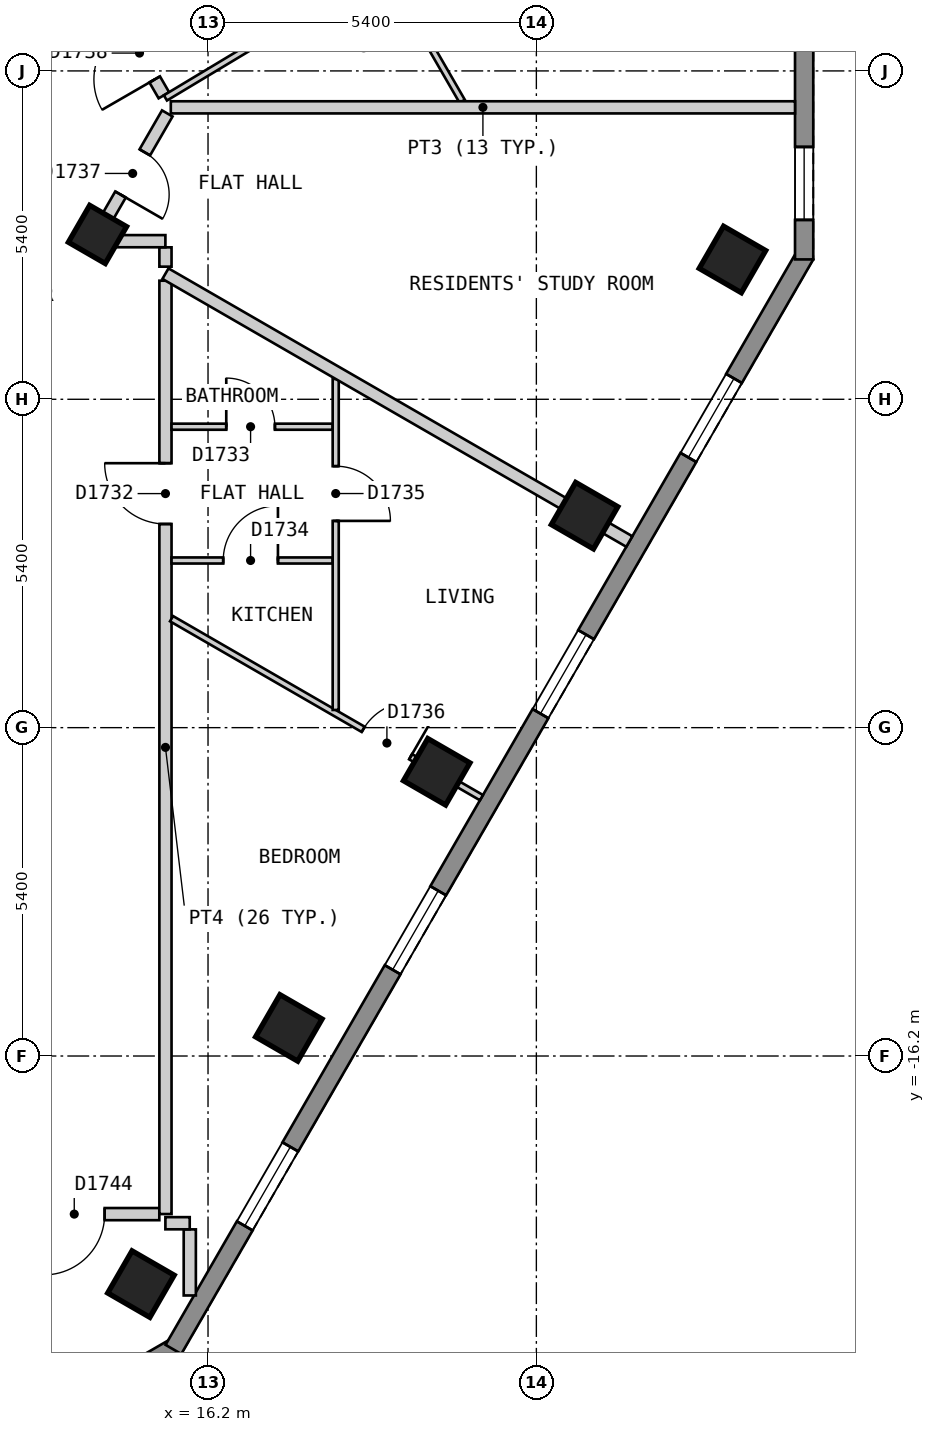
"""IFC4 building model, lengths in metres.
Left out: names, types, materials, properties, quantities, classifications, styles, units other than length and angle.
Written with IfcOpenShell. Run it as: python <this file> out.ifc"""

import sys

from ifc_helpers import new_model, si_unit, direction, frame, frame_2d, origin, origin_2d, place, context, subcontext, project, spatial, polyline, rectangle, outline, extrude, element, fill, save


model = new_model("IFC4")
c1 = context("Model", 3, precision=1e-05, world=origin(), true_north=direction((0.0, 1.0)))
c2 = subcontext(c1, "Body", "Model", "MODEL_VIEW")
j1 = project(units=[si_unit("LENGTHUNIT", "METRE"), si_unit("PLANEANGLEUNIT", "RADIAN")], contexts=[c1])
p1 = place(None, origin())
s1 = spatial("IfcSite", under=j1, at=p1, CompositionType="ELEMENT")
p2 = place(p1, origin())
s2 = spatial("IfcBuilding", under=s1, at=p2, CompositionType="ELEMENT")
p3 = place(p2, frame((0.0, 0.0, 181.2)))
s3 = spatial("IfcBuildingStorey", under=s2, at=p3, CompositionType="ELEMENT", Elevation=181.2)
for number, where, z_axis, x_axis in (
    (1, (15.097, -19.951, 0.0), (0.0, 0.0, 1.0), (0.5, 0.866, 0.0)),
    (2, (17.529, -15.738, 0.0), (0.0, 0.0, 1.0), (0.5, 0.866, 0.0)),
    (3, (19.961, -11.526, 0.0), (0.0, 0.0, 1.0), (0.5, 0.866, 0.0)),
    (4, (22.393, -7.314, 0.0), (0.0, 0.0, 1.0), (0.5, 0.866, 0.0)),
    (5, (24.825, -3.101, 0.0), (0.0, 0.0, 1.0), (0.5, 0.866, 0.0)),
):
    element("IfcColumn", number, at=place(p3, frame(where, z_axis=z_axis, x_axis=x_axis)), inside=s3, PredefinedType="COLUMN", context=c2, shape_type="SweptSolid", body=[
        extrude(rectangle(XDim=0.8, YDim=0.8, at=origin_2d()), origin(), (0.0, 0.0, 1.0), 3.0),
    ])
p4 = place(p3, frame((14.382, -2.689, 0.0), z_axis=(0.0, 0.0, 1.0), x_axis=(0.5, 0.866025403784, 0.0)))
e6 = element("IfcColumn", 6, at=p4, inside=s3, PredefinedType="COLUMN", context=c2, shape_type="SweptSolid", body=[
    extrude(rectangle(XDim=0.7, YDim=0.7, at=origin_2d()), origin(), (0.0, 0.0, 1.0), 3.0),
])
p5 = place(p3, frame((11.356, -23.47, 0.0), z_axis=(0.0, 0.0, 1.0), x_axis=(0.866022959057, 0.500004234368, 0.0)))
e7 = element("IfcWall", 7, at=p5, inside=s3, PredefinedType="SOLIDWALL", context=c2, shape_type="SweptSolid", body=[
    extrude(outline(polyline([(0.0, -0.15), (5.0, -0.15), (4.92, 0.15), (0.08, 0.15), (0.0, -0.15)])), origin(), (0.0, 0.0, 1.0), 2.7),
])
p6 = place(p5, frame((0.65, 0.0, 0.15)))
e8 = element("IfcOpeningElement", 8, at=p6, cuts=e7, PredefinedType="OPENING", context=c2, shape_type="SweptSolid", body=[
    extrude(rectangle(XDim=1.2, YDim=2.1, at=frame_2d((0.6, 1.05))), frame((0.0, 0.16, 0.0), z_axis=(0.0, -1.0, 0.0), x_axis=(1.0, 0.0, 0.0)), (0.0, 0.0, 1.0), 0.32),
])
p7 = place(p3, frame((15.631, -21.025, 0.0), z_axis=(0.0, 0.0, 1.0), x_axis=(0.500018670445, 0.86601462413, 0.0)))
e9 = element("IfcWall", 9, at=p7, inside=s3, PredefinedType="SOLIDWALL", context=c2, shape_type="SweptSolid", body=[
    extrude(outline(polyline([(0.0, -0.15), (20.785, -0.15), (20.705, 0.15), (0.08, 0.15), (0.0, -0.15)])), origin(), (0.0, 0.0, 1.0), 2.7),
])
p8 = place(p7, frame((2.346, 0.0, 0.15)))
e10 = element("IfcOpeningElement", 10, at=p8, cuts=e9, PredefinedType="OPENING", context=c2, shape_type="SweptSolid", body=[
    extrude(rectangle(XDim=1.5, YDim=2.1, at=frame_2d((0.75, 1.05))), frame((0.0, 0.16, 0.0), z_axis=(0.0, -1.0, 0.0), x_axis=(1.0, 0.0, 0.0)), (0.0, 0.0, 1.0), 0.32),
])
p9 = place(p7, frame((7.21, 0.0, 0.15)))
e11 = element("IfcOpeningElement", 11, at=p9, cuts=e9, PredefinedType="OPENING", context=c2, shape_type="SweptSolid", body=[
    extrude(rectangle(XDim=1.5, YDim=2.1, at=frame_2d((0.75, 1.05))), frame((0.0, 0.16, 0.0), z_axis=(0.0, -1.0, 0.0), x_axis=(1.0, 0.0, 0.0)), (0.0, 0.0, 1.0), 0.32),
])
p10 = place(p7, frame((12.073, 0.0, 0.15)))
e12 = element("IfcOpeningElement", 12, at=p10, cuts=e9, PredefinedType="OPENING", context=c2, shape_type="SweptSolid", body=[
    extrude(rectangle(XDim=1.5, YDim=2.1, at=frame_2d((0.75, 1.05))), frame((0.0, 0.16, 0.0), z_axis=(0.0, -1.0, 0.0), x_axis=(1.0, 0.0, 0.0)), (0.0, 0.0, 1.0), 0.32),
])
p11 = place(p7, frame((16.938, 0.0, 0.15)))
e13 = element("IfcOpeningElement", 13, at=p11, cuts=e9, PredefinedType="OPENING", context=c2, shape_type="SweptSolid", body=[
    extrude(rectangle(XDim=1.5, YDim=2.1, at=frame_2d((0.75, 1.05))), frame((0.0, 0.16, 0.0), z_axis=(0.0, -1.0, 0.0), x_axis=(1.0, 0.0, 0.0)), (0.0, 0.0, 1.0), 0.32),
])
p12 = place(p3, frame((26.004, -3.1, 0.0), z_axis=(0.0, 0.0, 1.0), x_axis=(0.0, 1.0, 0.0)))
e14 = element("IfcWall", 14, at=p12, inside=s3, PredefinedType="SOLIDWALL", context=c2, shape_type="SweptSolid", body=[
    extrude(outline(polyline([(0.0, -0.15), (5.0, -0.15), (4.92, 0.15), (0.08, 0.15), (0.0, -0.15)])), origin(), (0.0, 0.0, 1.0), 2.7),
])
p13 = place(p12, frame((0.65, 0.0, 0.15)))
e15 = element("IfcOpeningElement", 15, at=p13, cuts=e14, PredefinedType="OPENING", context=c2, shape_type="SweptSolid", body=[
    extrude(rectangle(XDim=1.2, YDim=2.1, at=frame_2d((0.6, 1.05))), frame((0.0, 0.16, 0.0), z_axis=(0.0, -1.0, 0.0), x_axis=(1.0, 0.0, 0.0)), (0.0, 0.0, 1.0), 0.32),
])
p14 = place(p3, frame((10.739, 7.8, 0.0), z_axis=(0.0, 0.0, 1.0), x_axis=(0.500023726918, -0.866011704609, 0.0)))
e16 = element("IfcWall", 16, at=p14, inside=s3, PredefinedType="PARTITIONING", context=c2, shape_type="SweptSolid", body=[
    extrude(rectangle(XDim=9.47, YDim=0.2, at=frame_2d((4.735, 0.0))), origin(), (0.0, 0.0, 1.0), 2.7),
])
p15 = place(p14, frame((8.168, 0.0, 0.0)))
e17 = element("IfcOpeningElement", 17, at=p15, cuts=e16, PredefinedType="OPENING", context=c2, shape_type="SweptSolid", body=[
    extrude(rectangle(XDim=1.0, YDim=2.1, at=frame_2d((0.5, 1.05))), frame((0.0, 0.11, 0.0), z_axis=(0.0, -1.0, 0.0), x_axis=(1.0, 0.0, 0.0)), (0.0, 0.0, 1.0), 0.22),
])
p16 = place(p3, frame((15.5, -2.901, 0.0), z_axis=(0.0, 0.0, 1.0), x_axis=(0.0, -1.0, 0.0)))
e18 = element("IfcWall", 18, at=p16, inside=s3, PredefinedType="PARTITIONING", context=c2, shape_type="SweptSolid", body=[
    extrude(rectangle(XDim=0.318, YDim=0.2, at=frame_2d((0.159, 0.0))), origin(), (0.0, 0.0, 1.0), 2.7),
])
p17 = place(p3, frame((13.3, -18.8, 0.0), z_axis=(0.0, 0.0, 1.0), x_axis=(1.0, 0.0, 0.0)))
e19 = element("IfcWall", 19, at=p17, inside=s3, PredefinedType="PARTITIONING", context=c2, shape_type="SweptSolid", body=[
    extrude(rectangle(XDim=2.099, YDim=0.2, at=frame_2d((1.049, 0.0))), origin(), (0.0, 0.0, 1.0), 2.7),
])
p18 = place(p17, frame((0.2, 0.0, 0.0)))
e20 = element("IfcOpeningElement", 20, at=p18, cuts=e19, PredefinedType="OPENING", context=c2, shape_type="SweptSolid", body=[
    extrude(rectangle(XDim=1.0, YDim=2.1, at=frame_2d((0.5, 1.05))), frame((0.0, 0.11, 0.0), z_axis=(0.0, -1.0, 0.0), x_axis=(1.0, 0.0, 0.0)), (0.0, 0.0, 1.0), 0.22),
])
p19 = place(p3, frame((14.433, -2.8, 0.0), z_axis=(0.0, 0.0, 1.0), x_axis=(1.0, 0.0, 0.0)))
e21 = element("IfcWall", 21, at=p19, inside=s3, PredefinedType="PARTITIONING", context=c2, shape_type="SweptSolid", body=[
    extrude(rectangle(XDim=1.066, YDim=0.2, at=frame_2d((0.533, 0.0))), origin(), (0.0, 0.0, 1.0), 2.7),
])
p20 = place(p3, frame((14.318, -2.8, 0.0), z_axis=(0.0, 0.0, 1.0), x_axis=(0.49964693309, 0.866229151122, 0.0)))
e22 = element("IfcWall", 22, at=p20, inside=s3, PredefinedType="PARTITIONING", context=c2, shape_type="SweptSolid", body=[
    extrude(rectangle(XDim=2.426, YDim=0.2, at=frame_2d((1.213, 0.0))), origin(), (0.0, 0.0, 1.0), 2.7),
])
p21 = place(p20, frame((0.886, 0.0, 0.0)))
e23 = element("IfcOpeningElement", 23, at=p21, cuts=e22, PredefinedType="OPENING", context=c2, shape_type="SweptSolid", body=[
    extrude(rectangle(XDim=0.8, YDim=2.1, at=frame_2d((0.4, 1.05))), frame((0.0, 0.11, 0.0), z_axis=(0.0, -1.0, 0.0), x_axis=(1.0, 0.0, 0.0)), (0.0, 0.0, 1.0), 0.22),
])
p22 = place(p3, frame((15.5, -18.799, 0.0), z_axis=(0.0, 0.0, 1.0), x_axis=(0.0, 1.0, 0.0)))
e24 = element("IfcWall", 24, at=p22, inside=s3, PredefinedType="PARTITIONING", context=c2, shape_type="SweptSolid", body=[
    extrude(rectangle(XDim=15.349, YDim=0.2, at=frame_2d((7.675, 0.0))), origin(), (0.0, 0.0, 1.0), 2.7),
])
p23 = place(p22, frame((11.348, 0.0, 0.0)))
e25 = element("IfcOpeningElement", 25, at=p23, cuts=e24, PredefinedType="OPENING", context=c2, shape_type="SweptSolid", body=[
    extrude(rectangle(XDim=1.0, YDim=2.1, at=frame_2d((0.5, 1.05))), frame((0.0, 0.11, 0.0), z_axis=(0.0, -1.0, 0.0), x_axis=(1.0, 0.0, 0.0)), (0.0, 0.0, 1.0), 0.22),
])
p24 = place(p3, frame((19.75, 0.592, 0.0), z_axis=(0.0, 0.0, 1.0), x_axis=(0.499974077718, -0.866040369504, 0.0)))
e26 = element("IfcWall", 26, at=p24, inside=s3, PredefinedType="PARTITIONING", context=c2, shape_type="SweptSolid", body=[
    extrude(rectangle(XDim=1.26, YDim=0.1, at=frame_2d((0.63, 0.0))), origin(), (0.0, 0.0, 1.0), 2.7),
])
p25 = place(p3, frame((15.6, -9.008, 0.0), z_axis=(0.0, 0.0, 1.0), x_axis=(0.866013576751, -0.500020484464, 0.0)))
e27 = element("IfcWall", 27, at=p25, inside=s3, PredefinedType="PARTITIONING", context=c2, shape_type="SweptSolid", body=[
    extrude(rectangle(XDim=5.885, YDim=0.1, at=frame_2d((2.943, 0.0))), origin(), (0.0, 0.0, 1.0), 2.7),
])
p26 = place(p25, frame((3.64, 0.0, 0.0)))
e28 = element("IfcOpeningElement", 28, at=p26, cuts=e27, PredefinedType="OPENING", context=c2, shape_type="SweptSolid", body=[
    extrude(rectangle(XDim=0.9, YDim=2.1, at=frame_2d((0.45, 1.05))), frame((0.0, 0.06, 0.0), z_axis=(0.0, -1.0, 0.0), x_axis=(1.0, 0.0, 0.0)), (0.0, 0.0, 1.0), 0.12),
])
p27 = place(p3, frame((15.6, -5.851, 0.0), z_axis=(0.0, 0.0, 1.0), x_axis=(1.0, 0.0, 0.0)))
e29 = element("IfcWall", 29, at=p27, inside=s3, PredefinedType="PARTITIONING", context=c2, shape_type="SweptSolid", body=[
    extrude(rectangle(XDim=2.65, YDim=0.1, at=frame_2d((1.325, 0.0))), origin(), (0.0, 0.0, 1.0), 2.7),
])
p28 = place(p27, frame((0.9, 0.0, 0.0)))
e30 = element("IfcOpeningElement", 30, at=p28, cuts=e29, PredefinedType="OPENING", context=c2, shape_type="SweptSolid", body=[
    extrude(rectangle(XDim=0.8, YDim=2.1, at=frame_2d((0.4, 1.05))), frame((0.0, 0.06, 0.0), z_axis=(0.0, -1.0, 0.0), x_axis=(1.0, 0.0, 0.0)), (0.0, 0.0, 1.0), 0.12),
])
p29 = place(p3, frame((15.6, -8.051, 0.0), z_axis=(0.0, 0.0, 1.0), x_axis=(1.0, 0.0, 0.0)))
e31 = element("IfcWall", 31, at=p29, inside=s3, PredefinedType="PARTITIONING", context=c2, shape_type="SweptSolid", body=[
    extrude(rectangle(XDim=2.65, YDim=0.1, at=frame_2d((1.325, 0.0))), origin(), (0.0, 0.0, 1.0), 2.7),
])
p30 = place(p29, frame((0.85, 0.0, 0.0)))
e32 = element("IfcOpeningElement", 32, at=p30, cuts=e31, PredefinedType="OPENING", context=c2, shape_type="SweptSolid", body=[
    extrude(rectangle(XDim=0.9, YDim=2.1, at=frame_2d((0.45, 1.05))), frame((0.0, 0.06, 0.0), z_axis=(0.0, -1.0, 0.0), x_axis=(1.0, 0.0, 0.0)), (0.0, 0.0, 1.0), 0.12),
])
p31 = place(p3, frame((18.3, -10.509, 0.0), z_axis=(0.0, 0.0, 1.0), x_axis=(0.0, 1.0, 0.0)))
e33 = element("IfcWall", 33, at=p31, inside=s3, PredefinedType="PARTITIONING", context=c2, shape_type="SweptSolid", body=[
    extrude(rectangle(XDim=5.443, YDim=0.1, at=frame_2d((2.722, 0.0))), origin(), (0.0, 0.0, 1.0), 2.7),
])
p32 = place(p31, frame((3.109, 0.0, 0.0)))
e34 = element("IfcOpeningElement", 34, at=p32, cuts=e33, PredefinedType="OPENING", context=c2, shape_type="SweptSolid", body=[
    extrude(rectangle(XDim=0.9, YDim=2.1, at=frame_2d((0.45, 1.05))), frame((0.0, 0.06, 0.0), z_axis=(0.0, -1.0, 0.0), x_axis=(1.0, 0.0, 0.0)), (0.0, 0.0, 1.0), 0.12),
])
p33 = place(p3, frame((15.499, -0.444, 0.0), z_axis=(0.0, 0.0, 1.0), x_axis=(0.857061798163, 0.515213619899, 0.0)))
e35 = element("IfcWall", 35, at=p33, inside=s3, PredefinedType="PARTITIONING", context=c2, shape_type="SweptSolid", body=[
    extrude(rectangle(XDim=4.15, YDim=0.1, at=frame_2d((2.075, 0.0))), origin(), (0.0, 0.0, 1.0), 2.7),
])
p34 = place(p33, frame((1.65, 0.0, 0.0)))
e36 = element("IfcOpeningElement", 36, at=p34, cuts=e35, PredefinedType="OPENING", context=c2, shape_type="SweptSolid", body=[
    extrude(rectangle(XDim=0.9, YDim=2.1, at=frame_2d((0.45, 1.05))), frame((0.0, 0.06, 0.0), z_axis=(0.0, -1.0, 0.0), x_axis=(1.0, 0.0, 0.0)), (0.0, 0.0, 1.0), 0.12),
])
p35 = place(p3, frame((15.9, -19.051, 0.0), z_axis=(0.0, 0.0, 1.0), x_axis=(0.0, -1.0, 0.0)))
e37 = element("IfcWall", 37, at=p35, inside=s3, PredefinedType="PARTITIONING", context=c2, shape_type="SweptSolid", body=[
    extrude(rectangle(XDim=1.087, YDim=0.2, at=frame_2d((0.543, 0.0))), origin(), (0.0, 0.0, 1.0), 2.7),
])
p36 = place(p3, frame((15.5, -3.334, 0.0), z_axis=(0.0, 0.0, 1.0), x_axis=(0.866001896501, -0.5000407136, 0.0)))
e38 = element("IfcWall", 38, at=p36, inside=s3, PredefinedType="PARTITIONING", context=c2, shape_type="SweptSolid", body=[
    extrude(rectangle(XDim=8.809, YDim=0.2, at=frame_2d((4.405, 0.0))), origin(), (0.0, 0.0, 1.0), 2.7),
])
p37 = place(p3, frame((15.588, -0.599, 0.0), z_axis=(0.0, 0.0, 1.0), x_axis=(1.0, 0.0, 0.0)))
e39 = element("IfcWall", 39, at=p37, inside=s3, PredefinedType="PARTITIONING", context=c2, shape_type="SweptSolid", body=[
    extrude(rectangle(XDim=10.266, YDim=0.2, at=frame_2d((5.133, 0.0))), origin(), (0.0, 0.0, 1.0), 2.7),
])
p38 = place(p3, frame((15.499, -18.95, 0.0), z_axis=(0.0, 0.0, 1.0), x_axis=(1.0, 0.0, 0.0)))
e40 = element("IfcWall", 40, at=p38, inside=s3, PredefinedType="PARTITIONING", context=c2, shape_type="SweptSolid", body=[
    extrude(rectangle(XDim=0.4, YDim=0.2, at=frame_2d((0.2, 0.0))), origin(), (0.0, 0.0, 1.0), 2.7),
])
p39 = place(p8, origin())
e41 = element("IfcWindow", 41, at=p39, inside=s3, PartitioningType="SINGLE_PANEL", PredefinedType="WINDOW", context=c2, shape_type="SweptSolid", body=[
    extrude(rectangle(XDim=1.5, YDim=2.1, at=frame_2d((0.75, 1.05))), frame((0.0, 0.03, 0.0), z_axis=(0.0, -1.0, 0.0), x_axis=(1.0, 0.0, 0.0)), (0.0, 0.0, 1.0), 0.06),
])
fill(e10, e41)
p40 = place(p9, origin())
e42 = element("IfcWindow", 42, at=p40, inside=s3, PartitioningType="SINGLE_PANEL", PredefinedType="WINDOW", context=c2, shape_type="SweptSolid", body=[
    extrude(rectangle(XDim=1.5, YDim=2.1, at=frame_2d((0.75, 1.05))), frame((0.0, 0.03, 0.0), z_axis=(0.0, -1.0, 0.0), x_axis=(1.0, 0.0, 0.0)), (0.0, 0.0, 1.0), 0.06),
])
fill(e11, e42)
p41 = place(p10, origin())
e43 = element("IfcWindow", 43, at=p41, inside=s3, PartitioningType="SINGLE_PANEL", PredefinedType="WINDOW", context=c2, shape_type="SweptSolid", body=[
    extrude(rectangle(XDim=1.5, YDim=2.1, at=frame_2d((0.75, 1.05))), frame((0.0, 0.03, 0.0), z_axis=(0.0, -1.0, 0.0), x_axis=(1.0, 0.0, 0.0)), (0.0, 0.0, 1.0), 0.06),
])
fill(e12, e43)
p42 = place(p11, origin())
e44 = element("IfcWindow", 44, at=p42, inside=s3, PartitioningType="SINGLE_PANEL", PredefinedType="WINDOW", context=c2, shape_type="SweptSolid", body=[
    extrude(rectangle(XDim=1.5, YDim=2.1, at=frame_2d((0.75, 1.05))), frame((0.0, 0.03, 0.0), z_axis=(0.0, -1.0, 0.0), x_axis=(1.0, 0.0, 0.0)), (0.0, 0.0, 1.0), 0.06),
])
fill(e13, e44)
p43 = place(p13, origin())
e45 = element("IfcWindow", 45, at=p43, inside=s3, PartitioningType="SINGLE_PANEL", PredefinedType="WINDOW", context=c2, shape_type="SweptSolid", body=[
    extrude(rectangle(XDim=1.2, YDim=2.1, at=frame_2d((0.6, 1.05))), frame((0.0, 0.03, 0.0), z_axis=(0.0, -1.0, 0.0), x_axis=(1.0, 0.0, 0.0)), (0.0, 0.0, 1.0), 0.06),
])
fill(e15, e45)
p44 = place(p23, origin())
e46 = element("IfcDoor", 46, at=p44, inside=s3, OperationType="SINGLE_SWING_RIGHT", PredefinedType="DOOR", context=c2, shape_type="SweptSolid", body=[
    extrude(rectangle(XDim=1.0, YDim=2.1, at=frame_2d((0.5, 1.05))), frame((0.0, 0.025, 0.0), z_axis=(0.0, -1.0, 0.0), x_axis=(1.0, 0.0, 0.0)), (0.0, 0.0, 1.0), 0.05),
])
fill(e25, e46)
p45 = place(p28, origin())
e47 = element("IfcDoor", 47, at=p45, inside=s3, OperationType="SINGLE_SWING_LEFT", PredefinedType="DOOR", context=c2, shape_type="SweptSolid", body=[
    extrude(rectangle(XDim=0.8, YDim=2.1, at=frame_2d((0.4, 1.05))), frame((0.0, 0.025, 0.0), z_axis=(0.0, -1.0, 0.0), x_axis=(1.0, 0.0, 0.0)), (0.0, 0.0, 1.0), 0.05),
])
fill(e30, e47)
p46 = place(p30, origin())
e48 = element("IfcDoor", 48, at=p46, inside=s3, OperationType="SINGLE_SWING_RIGHT", PredefinedType="DOOR", context=c2, shape_type="SweptSolid", body=[
    extrude(rectangle(XDim=0.9, YDim=2.1, at=frame_2d((0.45, 1.05))), frame((0.0, 0.025, 0.0), z_axis=(0.0, -1.0, 0.0), x_axis=(1.0, 0.0, 0.0)), (0.0, 0.0, 1.0), 0.05),
])
fill(e32, e48)
p47 = place(p32, origin())
e49 = element("IfcDoor", 49, at=p47, inside=s3, OperationType="SINGLE_SWING_LEFT", PredefinedType="DOOR", context=c2, shape_type="SweptSolid", body=[
    extrude(rectangle(XDim=0.9, YDim=2.1, at=frame_2d((0.45, 1.05))), frame((0.0, 0.025, 0.0), z_axis=(0.0, -1.0, 0.0), x_axis=(1.0, 0.0, 0.0)), (0.0, 0.0, 1.0), 0.05),
])
fill(e34, e49)
p48 = place(p26, origin())
e50 = element("IfcDoor", 50, at=p48, inside=s3, OperationType="SINGLE_SWING_RIGHT", PredefinedType="DOOR", context=c2, shape_type="SweptSolid", body=[
    extrude(rectangle(XDim=0.9, YDim=2.1, at=frame_2d((0.45, 1.05))), frame((0.0, 0.025, 0.0), z_axis=(0.0, -1.0, 0.0), x_axis=(1.0, 0.0, 0.0)), (0.0, 0.0, 1.0), 0.05),
])
fill(e28, e50)
p49 = place(p21, origin())
e51 = element("IfcDoor", 51, at=p49, inside=s3, OperationType="SINGLE_SWING_LEFT", PredefinedType="DOOR", context=c2, shape_type="SweptSolid", body=[
    extrude(rectangle(XDim=0.8, YDim=2.1, at=frame_2d((0.4, 1.05))), frame((0.0, 0.025, 0.0), z_axis=(0.0, -1.0, 0.0), x_axis=(1.0, 0.0, 0.0)), (0.0, 0.0, 1.0), 0.05),
])
fill(e23, e51)
p50 = place(p15, origin())
e52 = element("IfcDoor", 52, at=p50, inside=s3, OperationType="SINGLE_SWING_RIGHT", PredefinedType="DOOR", context=c2, shape_type="SweptSolid", body=[
    extrude(rectangle(XDim=1.0, YDim=2.1, at=frame_2d((0.5, 1.05))), frame((0.0, 0.025, 0.0), z_axis=(0.0, -1.0, 0.0), x_axis=(1.0, 0.0, 0.0)), (0.0, 0.0, 1.0), 0.05),
])
fill(e17, e52)
p51 = place(p18, origin())
e53 = element("IfcDoor", 53, at=p51, inside=s3, OperationType="SINGLE_SWING_LEFT", PredefinedType="DOOR", context=c2, shape_type="SweptSolid", body=[
    extrude(rectangle(XDim=1.0, YDim=2.1, at=frame_2d((0.5, 1.05))), frame((0.0, 0.025, 0.0), z_axis=(0.0, -1.0, 0.0), x_axis=(1.0, 0.0, 0.0)), (0.0, 0.0, 1.0), 0.05),
])
fill(e20, e53)
save(model, sys.argv[1])
